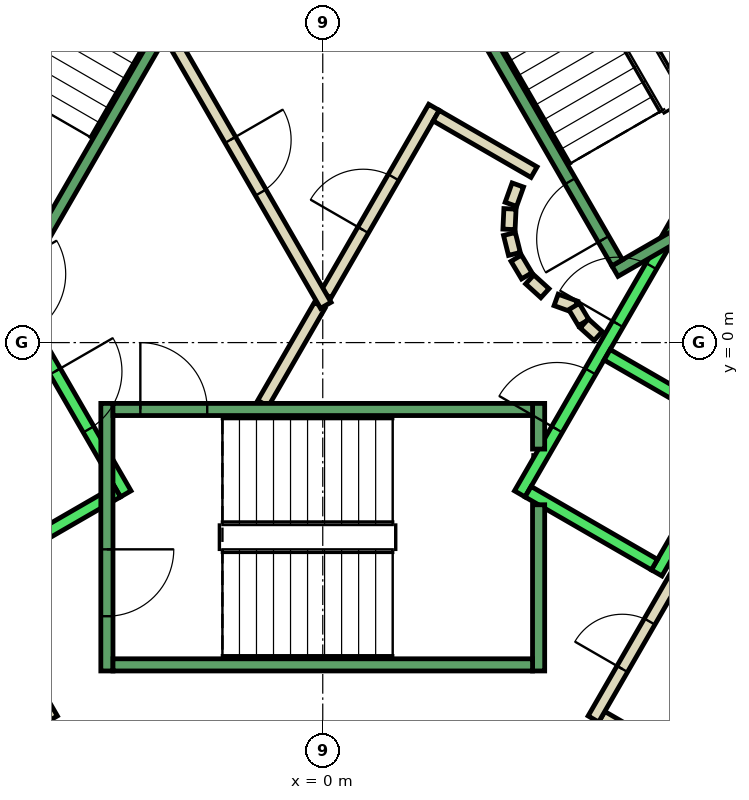
"""IFC4 building model, lengths in metres.
Left out: names, types, materials, properties, quantities, classifications, styles, units other than length and angle.
Written with IfcOpenShell. Run it as: python <this file> out.ifc"""

import sys

from ifc_helpers import new_model, si_unit, direction, frame, frame_2d, origin, place, context, subcontext, project, spatial, polyline, rectangle, outline, extrude, element, fill, save


model = new_model("IFC4")
c1 = context("Model", 3, precision=1e-05, world=origin(), true_north=direction((0.0, 1.0)))
c2 = subcontext(c1, "Body", "Model", "MODEL_VIEW")
j1 = project(units=[si_unit("LENGTHUNIT", "METRE"), si_unit("PLANEANGLEUNIT", "RADIAN")], contexts=[c1])
p1 = place(None, origin())
s1 = spatial("IfcSite", under=j1, at=p1, CompositionType="ELEMENT")
p2 = place(p1, origin())
s2 = spatial("IfcBuilding", under=s1, at=p2, CompositionType="ELEMENT")
p3 = place(p2, frame((0.0, 0.0, 255.8)))
s3 = spatial("IfcBuildingStorey", under=s2, at=p3, CompositionType="ELEMENT", Elevation=255.8)
p4 = place(p3, frame((0.0, 0.0, -0.34)))
e1 = element("IfcWall", 1, at=p4, inside=s3, PredefinedType="SHEAR", context=c2, shape_type="SweptSolid", body=[
    extrude(outline(polyline([(5.774, -7.5), (11.547, 2.5), (10.854, 2.5), (5.427, -6.9), (5.774, -7.5)])), origin(), (0.0, 0.0, 1.0), 3.6),
])
p5 = place(p3, frame((5.541, -6.703, 0.0), z_axis=(0.0, 0.0, 1.0), x_axis=(-0.86621513555, 0.499671230855, 0.0)))
e2 = element("IfcWall", 2, at=p5, inside=s3, PredefinedType="PARTITIONING", context=c2, shape_type="SweptSolid", body=[
    extrude(rectangle(XDim=1.1, YDim=0.2, at=frame_2d((0.55, 0.0))), origin(), (0.0, 0.0, 1.0), 3.26),
])
p6 = place(p3, frame((4.451, -6.19, 0.0), z_axis=(0.0, 0.0, 1.0), x_axis=(0.500011755427, 0.866018616679, 0.0)))
e3 = element("IfcWall", 3, at=p6, inside=s3, PredefinedType="PARTITIONING", context=c2, shape_type="SweptSolid", body=[
    extrude(rectangle(XDim=2.8, YDim=0.2, at=frame_2d((1.4, 0.0))), origin(), (0.0, 0.0, 1.0), 3.26),
])
p7 = place(p6, frame((0.95, 0.0, 0.0)))
e4 = element("IfcOpeningElement", 4, at=p7, cuts=e3, PredefinedType="OPENING", context=c2, shape_type="SweptSolid", body=[
    extrude(rectangle(XDim=0.9, YDim=2.1, at=frame_2d((0.45, 1.05))), frame((0.0, 0.11, 0.0), z_axis=(0.0, -1.0, 0.0), x_axis=(1.0, 0.0, 0.0)), (0.0, 0.0, 1.0), 0.22),
])
p8 = place(p3, frame((-5.851, -3.765, 0.0), z_axis=(0.0, 0.0, 1.0), x_axis=(0.500011755427, -0.866018616679, 0.0)))
e5 = element("IfcWall", 5, at=p8, inside=s3, PredefinedType="PARTITIONING", context=c2, shape_type="SweptSolid", body=[
    extrude(rectangle(XDim=2.8, YDim=0.2, at=frame_2d((1.4, 0.0))), origin(), (0.0, 0.0, 1.0), 3.26),
])
p9 = place(p8, frame((0.95, 0.0, 0.0)))
e6 = element("IfcOpeningElement", 6, at=p9, cuts=e5, PredefinedType="OPENING", context=c2, shape_type="SweptSolid", body=[
    extrude(rectangle(XDim=0.9, YDim=2.1, at=frame_2d((0.45, 1.05))), frame((0.0, 0.11, 0.0), z_axis=(0.0, -1.0, 0.0), x_axis=(1.0, 0.0, 0.0)), (0.0, 0.0, 1.0), 0.22),
])
p10 = place(p3, frame((-0.982, -1.0, 0.0), z_axis=(0.0, 0.0, 1.0), x_axis=(0.50024047865, 0.865886518847, 0.0)))
e7 = element("IfcWall", 7, at=p10, inside=s3, PredefinedType="PARTITIONING", context=c2, shape_type="SweptSolid", body=[
    extrude(rectangle(XDim=1.863, YDim=0.2, at=frame_2d((0.931, 0.0))), origin(), (0.0, 0.0, 1.0), 3.26),
])
p11 = place(p3, frame((0.05, 0.787, 0.0), z_axis=(0.0, 0.0, 1.0), x_axis=(0.499954076797, 0.866051915934, 0.0)))
e8 = element("IfcWall", 8, at=p11, inside=s3, PredefinedType="PARTITIONING", context=c2, shape_type="SweptSolid", body=[
    extrude(rectangle(XDim=3.558, YDim=0.2, at=frame_2d((1.779, 0.0))), origin(), (0.0, 0.0, 1.0), 3.26),
])
p12 = place(p11, frame((1.229, 0.0, 0.0)))
e9 = element("IfcOpeningElement", 9, at=p12, cuts=e8, PredefinedType="OPENING", context=c2, shape_type="SweptSolid", body=[
    extrude(rectangle(XDim=1.0, YDim=2.1, at=frame_2d((0.5, 1.05))), frame((0.0, 0.11, 0.0), z_axis=(0.0, -1.0, 0.0), x_axis=(1.0, 0.0, 0.0)), (0.0, 0.0, 1.0), 0.22),
])
p13 = place(p3, frame((1.866, 3.732, 0.0), z_axis=(0.0, 0.0, 1.0), x_axis=(0.866043361281, -0.499968895414, 0.0)))
e10 = element("IfcWall", 10, at=p13, inside=s3, PredefinedType="PARTITIONING", context=c2, shape_type="SweptSolid", body=[
    extrude(rectangle(XDim=1.858, YDim=0.2, at=frame_2d((0.929, 0.0))), origin(), (0.0, 0.0, 1.0), 3.26),
])
p14 = place(p3, frame((3.208, 2.592, 0.0), z_axis=(0.0, 0.0, 1.0), x_axis=(-0.337388820924, -0.941365382578, 0.0)))
e11 = element("IfcWall", 11, at=p14, inside=s3, PredefinedType="PARTITIONING", context=c2, shape_type="SweptSolid", body=[
    extrude(rectangle(XDim=0.338, YDim=0.2, at=frame_2d((0.169, 0.0))), origin(), (0.0, 0.0, 1.0), 3.26),
])
p15 = place(p3, frame((3.079, 2.199, 0.0), z_axis=(0.0, 0.0, 1.0), x_axis=(-0.047771483479, -0.998858290933, 0.0)))
e12 = element("IfcWall", 12, at=p15, inside=s3, PredefinedType="PARTITIONING", context=c2, shape_type="SweptSolid", body=[
    extrude(rectangle(XDim=0.337, YDim=0.2, at=frame_2d((0.169, 0.0))), origin(), (0.0, 0.0, 1.0), 3.26),
])
p16 = place(p3, frame((3.07, 1.786, 0.0), z_axis=(0.0, 0.0, 1.0), x_axis=(0.242705583207, -0.970099994784, 0.0)))
e13 = element("IfcWall", 13, at=p16, inside=s3, PredefinedType="PARTITIONING", context=c2, shape_type="SweptSolid", body=[
    extrude(rectangle(XDim=0.338, YDim=0.2, at=frame_2d((0.169, 0.0))), origin(), (0.0, 0.0, 1.0), 3.26),
])
for number, where, z_axis, x_axis in (
    (14, (3.182, 1.388, 0.0), (0.0, 0.0, 1.0), (0.512, -0.859, 0.0)),
    (15, (3.404, 1.039, 0.0), (0.0, 0.0, 1.0), (0.74, -0.672, 0.0)),
):
    element("IfcWall", number, at=place(p3, frame(where, z_axis=z_axis, x_axis=x_axis)), inside=s3, PredefinedType="PARTITIONING", context=c2, shape_type="SweptSolid", body=[
        extrude(rectangle(XDim=0.338, YDim=0.2, at=frame_2d((0.169, 0.0))), origin(), (0.0, 0.0, 1.0), 3.26),
    ])
p17 = place(p3, frame((3.838, 0.702, 0.0), z_axis=(0.0, 0.0, 1.0), x_axis=(0.941035081519, -0.338308993895, 0.0)))
e16 = element("IfcWall", 16, at=p17, inside=s3, PredefinedType="PARTITIONING", context=c2, shape_type="SweptSolid", body=[
    extrude(rectangle(XDim=0.337, YDim=0.2, at=frame_2d((0.168, 0.0))), origin(), (0.0, 0.0, 1.0), 3.26),
])
p18 = place(p3, frame((4.132, 0.593, 0.0), z_axis=(0.0, 0.0, 1.0), x_axis=(0.513561617048, -0.858052717201, 0.0)))
e17 = element("IfcWall", 17, at=p18, inside=s3, PredefinedType="PARTITIONING", context=c2, shape_type="SweptSolid", body=[
    extrude(rectangle(XDim=0.308, YDim=0.2, at=frame_2d((0.154, 0.0))), origin(), (0.0, 0.0, 1.0), 3.26),
])
p19 = place(p3, frame((4.301, 0.315, 0.0), z_axis=(0.0, 0.0, 1.0), x_axis=(0.741798017506, -0.670623367639, 0.0)))
e18 = element("IfcWall", 18, at=p19, inside=s3, PredefinedType="PARTITIONING", context=c2, shape_type="SweptSolid", body=[
    extrude(rectangle(XDim=0.309, YDim=0.2, at=frame_2d((0.154, 0.0))), origin(), (0.0, 0.0, 1.0), 3.26),
])
p20 = place(p3, frame((-2.54, 5.1, 0.0), z_axis=(0.0, 0.0, 1.0), x_axis=(0.499925051871, -0.866068670783, 0.0)))
e19 = element("IfcWall", 19, at=p20, inside=s3, PredefinedType="PARTITIONING", context=c2, shape_type="SweptSolid", body=[
    extrude(rectangle(XDim=5.181, YDim=0.2, at=frame_2d((2.59, 0.0))), origin(), (0.0, 0.0, 1.0), 3.26),
])
p21 = place(p20, frame((2.04, 0.0, 0.0)))
e20 = element("IfcOpeningElement", 20, at=p21, cuts=e19, PredefinedType="OPENING", context=c2, shape_type="SweptSolid", body=[
    extrude(rectangle(XDim=1.0, YDim=2.1, at=frame_2d((0.5, 1.05))), frame((0.0, 0.11, 0.0), z_axis=(0.0, -1.0, 0.0), x_axis=(1.0, 0.0, 0.0)), (0.0, 0.0, 1.0), 0.22),
])
p22 = place(p3, frame((-5.94, 2.188, 0.0), z_axis=(0.0, 0.0, 1.0), x_axis=(0.500034260056, -0.866005622828, 0.0)))
e21 = element("IfcWall", 21, at=p22, inside=s3, PredefinedType="STANDARD", context=c2, shape_type="SweptSolid", body=[
    extrude(rectangle(XDim=5.399, YDim=0.2, at=frame_2d((2.7, 0.0))), origin(), (0.0, 0.0, 1.0), 3.26),
])
p23 = place(p22, frame((3.075, 0.0, 0.0)))
e22 = element("IfcOpeningElement", 22, at=p23, cuts=e21, PredefinedType="OPENING", context=c2, shape_type="SweptSolid", body=[
    extrude(rectangle(XDim=1.1, YDim=2.1, at=frame_2d((0.55, 1.05))), frame((0.0, 0.11, 0.0), z_axis=(0.0, -1.0, 0.0), x_axis=(1.0, 0.0, 0.0)), (0.0, 0.0, 1.0), 0.22),
])
p24 = place(p22, frame((1.225, 0.0, 0.0)))
e23 = element("IfcOpeningElement", 23, at=p24, cuts=e21, PredefinedType="OPENING", context=c2, shape_type="SweptSolid", body=[
    extrude(rectangle(XDim=1.1, YDim=2.1, at=frame_2d((0.55, 1.05))), frame((0.0, 0.11, 0.0), z_axis=(0.0, -1.0, 0.0), x_axis=(1.0, 0.0, 0.0)), (0.0, 0.0, 1.0), 0.22),
])
p25 = place(p3, frame((-3.377, -2.452, 0.0), z_axis=(0.0, 0.0, 1.0), x_axis=(-0.865955154139, -0.50012165622, 0.0)))
e24 = element("IfcWall", 24, at=p25, inside=s3, PredefinedType="STANDARD", context=c2, shape_type="SweptSolid", body=[
    extrude(rectangle(XDim=2.4, YDim=0.2, at=frame_2d((1.2, 0.0))), origin(), (0.0, 0.0, 1.0), 3.26),
])
p26 = place(p3, frame((3.24, -2.488, 0.0), z_axis=(0.0, 0.0, 1.0), x_axis=(0.500034260056, 0.866005622828, 0.0)))
e25 = element("IfcWall", 25, at=p26, inside=s3, PredefinedType="STANDARD", context=c2, shape_type="SweptSolid", body=[
    extrude(rectangle(XDim=5.399, YDim=0.2, at=frame_2d((2.7, 0.0))), origin(), (0.0, 0.0, 1.0), 3.26),
])
p27 = place(p26, frame((3.225, 0.0, 0.0)))
e26 = element("IfcOpeningElement", 26, at=p27, cuts=e25, PredefinedType="OPENING", context=c2, shape_type="SweptSolid", body=[
    extrude(rectangle(XDim=1.1, YDim=2.1, at=frame_2d((0.55, 1.05))), frame((0.0, 0.11, 0.0), z_axis=(0.0, -1.0, 0.0), x_axis=(1.0, 0.0, 0.0)), (0.0, 0.0, 1.0), 0.22),
])
p28 = place(p26, frame((1.225, 0.0, 0.0)))
e27 = element("IfcOpeningElement", 27, at=p28, cuts=e25, PredefinedType="OPENING", context=c2, shape_type="SweptSolid", body=[
    extrude(rectangle(XDim=1.1, YDim=2.1, at=frame_2d((0.55, 1.05))), frame((0.0, 0.11, 0.0), z_axis=(0.0, -1.0, 0.0), x_axis=(1.0, 0.0, 0.0)), (0.0, 0.0, 1.0), 0.22),
])
p29 = place(p3, frame((5.492, -3.788, 0.0), z_axis=(0.0, 0.0, 1.0), x_axis=(0.500034260056, 0.866005622828, 0.0)))
e28 = element("IfcWall", 28, at=p29, inside=s3, PredefinedType="STANDARD", context=c2, shape_type="SweptSolid", body=[
    extrude(rectangle(XDim=5.399, YDim=0.2, at=frame_2d((2.7, 0.0))), origin(), (0.0, 0.0, 1.0), 3.26),
])
p30 = place(p3, frame((3.377, -2.452, 0.0), z_axis=(0.0, 0.0, 1.0), x_axis=(0.865955154139, -0.50012165622, 0.0)))
e29 = element("IfcWall", 29, at=p30, inside=s3, PredefinedType="STANDARD", context=c2, shape_type="SweptSolid", body=[
    extrude(rectangle(XDim=2.4, YDim=0.2, at=frame_2d((1.2, 0.0))), origin(), (0.0, 0.0, 1.0), 3.26),
])
p31 = place(p3, frame((4.677, -0.2, 0.0), z_axis=(0.0, 0.0, 1.0), x_axis=(0.865973769406, -0.500089422704, 0.0)))
e30 = element("IfcWall", 30, at=p31, inside=s3, PredefinedType="STANDARD", context=c2, shape_type="SweptSolid", body=[
    extrude(rectangle(XDim=2.399, YDim=0.2, at=frame_2d((1.2, 0.0))), origin(), (0.0, 0.0, 1.0), 3.26),
])
p32 = place(p3, frame((-3.55, -1.0, 0.0), z_axis=(0.0, 0.0, 1.0), x_axis=(0.0, -1.0, 0.0)))
e31 = element("IfcWall", 31, at=p32, inside=s3, PredefinedType="STANDARD", context=c2, shape_type="SweptSolid", body=[
    extrude(rectangle(XDim=4.4, YDim=0.2, at=frame_2d((2.2, 0.0))), origin(), (0.0, 0.0, 1.0), 3.26),
])
p33 = place(p32, frame((2.4, 0.0, 0.0)))
e32 = element("IfcOpeningElement", 32, at=p33, cuts=e31, PredefinedType="OPENING", context=c2, shape_type="SweptSolid", body=[
    extrude(rectangle(XDim=1.1, YDim=2.2, at=frame_2d((0.55, 1.1))), frame((0.0, 0.11, 0.0), z_axis=(0.0, -1.0, 0.0), x_axis=(1.0, 0.0, 0.0)), (0.0, 0.0, 1.0), 0.22),
])
p34 = place(p3, frame((3.55, -2.667, 0.0), z_axis=(0.0, 0.0, 1.0), x_axis=(0.0, -1.0, 0.0)))
e33 = element("IfcWall", 33, at=p34, inside=s3, PredefinedType="STANDARD", context=c2, shape_type="SweptSolid", body=[
    extrude(rectangle(XDim=2.733, YDim=0.2, at=frame_2d((1.366, 0.0))), origin(), (0.0, 0.0, 1.0), 3.26),
])
p35 = place(p3, frame((3.55, -1.0, 0.0), z_axis=(0.0, 0.0, 1.0), x_axis=(0.0, -1.0, 0.0)))
e34 = element("IfcWall", 34, at=p35, inside=s3, PredefinedType="STANDARD", context=c2, shape_type="SweptSolid", body=[
    extrude(rectangle(XDim=0.751, YDim=0.2, at=frame_2d((0.375, 0.0))), origin(), (0.0, 0.0, 1.0), 3.26),
])
p36 = place(p3, frame((-3.45, -1.1, 0.0), z_axis=(0.0, 0.0, 1.0), x_axis=(1.0, 0.0, 0.0)))
e35 = element("IfcWall", 35, at=p36, inside=s3, PredefinedType="STANDARD", context=c2, shape_type="SweptSolid", body=[
    extrude(rectangle(XDim=6.9, YDim=0.2, at=frame_2d((3.45, 0.0))), origin(), (0.0, 0.0, 1.0), 3.26),
])
p37 = place(p36, frame((0.45, 0.0, 0.0)))
e36 = element("IfcOpeningElement", 36, at=p37, cuts=e35, PredefinedType="OPENING", context=c2, shape_type="SweptSolid", body=[
    extrude(rectangle(XDim=1.1, YDim=2.2, at=frame_2d((0.55, 1.1))), frame((0.0, 0.11, 0.0), z_axis=(0.0, -1.0, 0.0), x_axis=(1.0, 0.0, 0.0)), (0.0, 0.0, 1.0), 0.22),
])
p38 = place(p3, frame((-3.45, -5.3, 0.0), z_axis=(0.0, 0.0, 1.0), x_axis=(1.0, 0.0, 0.0)))
e37 = element("IfcWall", 37, at=p38, inside=s3, PredefinedType="STANDARD", context=c2, shape_type="SweptSolid", body=[
    extrude(rectangle(XDim=6.9, YDim=0.2, at=frame_2d((3.45, 0.0))), origin(), (0.0, 0.0, 1.0), 3.26),
])
p39 = place(p3, frame((4.806, 1.176, 0.0), z_axis=(0.0, 0.0, 1.0), x_axis=(0.866059941101, 0.499940174841, 0.0)))
e38 = element("IfcWall", 38, at=p39, inside=s3, PredefinedType="STANDARD", context=c2, shape_type="SweptSolid", body=[
    extrude(rectangle(XDim=4.4, YDim=0.2, at=frame_2d((2.2, 0.0))), origin(), (0.0, 0.0, 1.0), 3.26),
])
p40 = place(p39, frame((2.4, 0.0, 0.0)))
e39 = element("IfcOpeningElement", 39, at=p40, cuts=e38, PredefinedType="OPENING", context=c2, shape_type="SweptSolid", body=[
    extrude(rectangle(XDim=1.1, YDim=2.2, at=frame_2d((0.55, 1.1))), frame((0.0, 0.11, 0.0), z_axis=(0.0, -1.0, 0.0), x_axis=(1.0, 0.0, 0.0)), (0.0, 0.0, 1.0), 0.22),
])
p41 = place(p3, frame((4.843, 1.312, 0.0), z_axis=(0.0, 0.0, 1.0), x_axis=(-0.499963383562, 0.866046543262, 0.0)))
e40 = element("IfcWall", 40, at=p41, inside=s3, PredefinedType="STANDARD", context=c2, shape_type="SweptSolid", body=[
    extrude(rectangle(XDim=6.9, YDim=0.2, at=frame_2d((3.45, 0.0))), origin(), (0.0, 0.0, 1.0), 3.26),
])
p42 = place(p41, frame((0.45, 0.0, 0.0)))
e41 = element("IfcOpeningElement", 41, at=p42, cuts=e40, PredefinedType="OPENING", context=c2, shape_type="SweptSolid", body=[
    extrude(rectangle(XDim=1.1, YDim=2.2, at=frame_2d((0.55, 1.1))), frame((0.0, 0.11, 0.0), z_axis=(0.0, -1.0, 0.0), x_axis=(1.0, 0.0, 0.0)), (0.0, 0.0, 1.0), 0.22),
])
p43 = place(p3, frame((8.48, 3.412, 0.0), z_axis=(0.0, 0.0, 1.0), x_axis=(-0.499978703459, 0.866037698999, 0.0)))
e42 = element("IfcWall", 42, at=p43, inside=s3, PredefinedType="STANDARD", context=c2, shape_type="SweptSolid", body=[
    extrude(rectangle(XDim=6.9, YDim=0.2, at=frame_2d((3.45, 0.0))), origin(), (0.0, 0.0, 1.0), 3.26),
])
p44 = place(p3, frame((-1.393, 7.288, 0.0), z_axis=(0.0, 0.0, 1.0), x_axis=(-0.499963383562, -0.866046543262, 0.0)))
e43 = element("IfcWall", 43, at=p44, inside=s3, PredefinedType="STANDARD", context=c2, shape_type="SweptSolid", body=[
    extrude(rectangle(XDim=6.9, YDim=0.2, at=frame_2d((3.45, 0.0))), origin(), (0.0, 0.0, 1.0), 3.26),
])
p45 = place(p44, frame((0.45, 0.0, 0.0)))
e44 = element("IfcOpeningElement", 44, at=p45, cuts=e43, PredefinedType="OPENING", context=c2, shape_type="SweptSolid", body=[
    extrude(rectangle(XDim=1.1, YDim=2.2, at=frame_2d((0.55, 1.1))), frame((0.0, 0.11, 0.0), z_axis=(0.0, -1.0, 0.0), x_axis=(1.0, 0.0, 0.0)), (0.0, 0.0, 1.0), 0.22),
])
p46 = place(p12, origin())
e45 = element("IfcDoor", 45, at=p46, inside=s3, OperationType="SINGLE_SWING_RIGHT", PredefinedType="DOOR", context=c2, shape_type="SweptSolid", body=[
    extrude(rectangle(XDim=1.0, YDim=2.1, at=frame_2d((0.5, 1.05))), frame((0.0, 0.025, 0.0), z_axis=(0.0, -1.0, 0.0), x_axis=(1.0, 0.0, 0.0)), (0.0, 0.0, 1.0), 0.05),
])
fill(e9, e45)
p47 = place(p21, origin())
e46 = element("IfcDoor", 46, at=p47, inside=s3, OperationType="SINGLE_SWING_RIGHT", PredefinedType="DOOR", context=c2, shape_type="SweptSolid", body=[
    extrude(rectangle(XDim=1.0, YDim=2.1, at=frame_2d((0.5, 1.05))), frame((0.0, 0.025, 0.0), z_axis=(0.0, -1.0, 0.0), x_axis=(1.0, 0.0, 0.0)), (0.0, 0.0, 1.0), 0.05),
])
fill(e20, e46)
p48 = place(p7, origin())
e47 = element("IfcDoor", 47, at=p48, inside=s3, OperationType="SINGLE_SWING_LEFT", PredefinedType="DOOR", context=c2, shape_type="SweptSolid", body=[
    extrude(rectangle(XDim=0.9, YDim=2.1, at=frame_2d((0.45, 1.05))), frame((0.0, 0.025, 0.0), z_axis=(0.0, -1.0, 0.0), x_axis=(1.0, 0.0, 0.0)), (0.0, 0.0, 1.0), 0.05),
])
fill(e4, e47)
p49 = place(p27, origin())
e48 = element("IfcDoor", 48, at=p49, inside=s3, OperationType="SLIDING_TO_LEFT", PredefinedType="DOOR", context=c2, shape_type="SweptSolid", body=[
    extrude(rectangle(XDim=1.1, YDim=2.1, at=frame_2d((0.55, 1.05))), frame((0.0, 0.025, 0.0), z_axis=(0.0, -1.0, 0.0), x_axis=(1.0, 0.0, 0.0)), (0.0, 0.0, 1.0), 0.05),
])
fill(e26, e48)
p50 = place(p23, origin())
e49 = element("IfcDoor", 49, at=p50, inside=s3, OperationType="SLIDING_TO_LEFT", PredefinedType="DOOR", context=c2, shape_type="SweptSolid", body=[
    extrude(rectangle(XDim=1.1, YDim=2.1, at=frame_2d((0.55, 1.05))), frame((0.0, 0.025, 0.0), z_axis=(0.0, -1.0, 0.0), x_axis=(1.0, 0.0, 0.0)), (0.0, 0.0, 1.0), 0.05),
])
fill(e22, e49)
p51 = place(p28, origin())
e50 = element("IfcDoor", 50, at=p51, inside=s3, OperationType="SLIDING_TO_LEFT", PredefinedType="DOOR", context=c2, shape_type="SweptSolid", body=[
    extrude(rectangle(XDim=1.1, YDim=2.1, at=frame_2d((0.55, 1.05))), frame((0.0, 0.025, 0.0), z_axis=(0.0, -1.0, 0.0), x_axis=(1.0, 0.0, 0.0)), (0.0, 0.0, 1.0), 0.05),
])
fill(e27, e50)
p52 = place(p37, origin())
e51 = element("IfcDoor", 51, at=p52, inside=s3, OperationType="SINGLE_SWING_LEFT", PredefinedType="DOOR", context=c2, shape_type="SweptSolid", body=[
    extrude(rectangle(XDim=1.1, YDim=2.2, at=frame_2d((0.55, 1.1))), frame((0.0, 0.025, 0.0), z_axis=(0.0, -1.0, 0.0), x_axis=(1.0, 0.0, 0.0)), (0.0, 0.0, 1.0), 0.05),
])
fill(e36, e51)
p53 = place(p33, origin())
e52 = element("IfcDoor", 52, at=p53, inside=s3, OperationType="SINGLE_SWING_LEFT", PredefinedType="DOOR", context=c2, shape_type="SweptSolid", body=[
    extrude(rectangle(XDim=1.1, YDim=2.2, at=frame_2d((0.55, 1.1))), frame((0.0, 0.025, 0.0), z_axis=(0.0, -1.0, 0.0), x_axis=(1.0, 0.0, 0.0)), (0.0, 0.0, 1.0), 0.05),
])
fill(e32, e52)
p54 = place(p42, origin())
e53 = element("IfcDoor", 53, at=p54, inside=s3, OperationType="SINGLE_SWING_LEFT", PredefinedType="DOOR", context=c2, shape_type="SweptSolid", body=[
    extrude(rectangle(XDim=1.1, YDim=2.2, at=frame_2d((0.55, 1.1))), frame((0.0, 0.025, 0.0), z_axis=(0.0, -1.0, 0.0), x_axis=(1.0, 0.0, 0.0)), (0.0, 0.0, 1.0), 0.05),
])
fill(e41, e53)
save(model, sys.argv[1])
